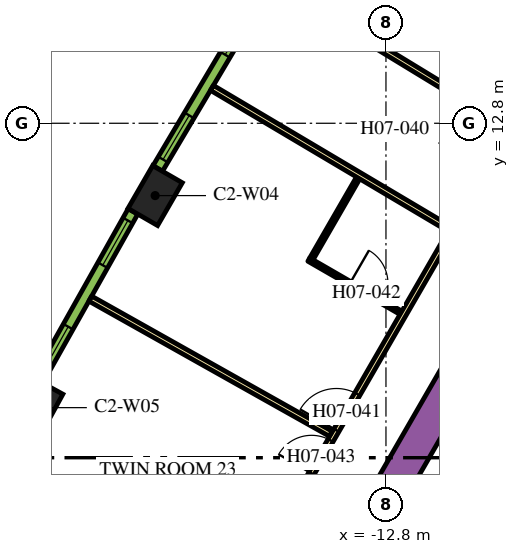
"""IFC4 building model, lengths in metres.
Left out: names, types, materials, properties, quantities, classifications, styles, units other than length and angle.
Written with IfcOpenShell. Run it as: python <this file> out.ifc"""

import sys

from ifc_helpers import new_model, si_unit, direction, frame, frame_2d, origin, origin_2d, place, context, subcontext, project, spatial, rectangle, extrude, element, fill, save


model = new_model("IFC4")
c1 = context("Model", 3, precision=1e-05, world=origin(), true_north=direction((0.0, 1.0)))
c2 = subcontext(c1, "Body", "Model", "MODEL_VIEW")
j1 = project(units=[si_unit("LENGTHUNIT", "METRE"), si_unit("PLANEANGLEUNIT", "RADIAN")], contexts=[c1])
p1 = place(None, origin())
s1 = spatial("IfcSite", under=j1, at=p1, CompositionType="ELEMENT")
p2 = place(p1, origin())
s2 = spatial("IfcBuilding", under=s1, at=p2, CompositionType="ELEMENT")
p3 = place(p2, frame((0.0, 0.0, 99.3)))
s3 = spatial("IfcBuildingStorey", under=s2, at=p3, CompositionType="ELEMENT", Elevation=99.3)
for number, where, z_axis, x_axis in (
    (1, (-18.874, 10.897, 0.0), (0.0, 0.0, 1.0), (-0.5, -0.866, 0.0)),
    (2, (-22.009, 5.317, 0.0), (0.0, 0.0, 1.0), (-0.48, -0.877, 0.0)),
):
    element("IfcColumn", number, at=place(p3, frame(where, z_axis=z_axis, x_axis=x_axis)), inside=s3, PredefinedType="COLUMN", context=c2, shape_type="SweptSolid", body=[
        extrude(rectangle(XDim=1.3, YDim=0.9, at=origin_2d()), origin(), (0.0, 0.0, 1.0), 3.9),
    ])
p4 = place(p3, frame((-15.36, -1.503, 0.0), z_axis=(0.0, 0.0, 1.0), x_axis=(0.50000389221, 0.866023156604, 0.0)))
e3 = element("IfcWall", 3, at=p4, inside=s3, PredefinedType="SOLIDWALL", context=c2, shape_type="SweptSolid", body=[
    extrude(rectangle(XDim=21.0, YDim=0.9, at=frame_2d((10.5, 0.0))), origin(), (0.0, 0.0, 1.0), 3.9),
])
p5 = place(p3, frame((-19.081, -3.9, 0.0), z_axis=(0.0, 0.0, 1.0), x_axis=(0.499998313975, 0.866026377209, 0.0)))
e4 = element("IfcWall", 4, at=p5, inside=s3, PredefinedType="PARTITIONING", context=c2, shape_type="SweptSolid", body=[
    extrude(rectangle(XDim=25.766, YDim=0.15, at=frame_2d((12.883, 0.0))), origin(), (0.0, 0.0, 1.0), 2.75),
])
p6 = place(p5, frame((19.306, 0.0, 0.0)))
e5 = element("IfcOpeningElement", 5, at=p6, cuts=e4, PredefinedType="OPENING", context=c2, shape_type="SweptSolid", body=[
    extrude(rectangle(XDim=1.0, YDim=2.1, at=frame_2d((0.5, 1.05))), frame((0.0, 0.085, 0.0), z_axis=(0.0, -1.0, 0.0), x_axis=(1.0, 0.0, 0.0)), (0.0, 0.0, 1.0), 0.17),
])
p7 = place(p5, frame((17.144, 0.0, 0.0)))
e6 = element("IfcOpeningElement", 6, at=p7, cuts=e4, PredefinedType="OPENING", context=c2, shape_type="SweptSolid", body=[
    extrude(rectangle(XDim=0.9, YDim=2.1, at=frame_2d((0.45, 1.05))), frame((0.0, 0.085, 0.0), z_axis=(0.0, -1.0, 0.0), x_axis=(1.0, 0.0, 0.0)), (0.0, 0.0, 1.0), 0.17),
])
p8 = place(p5, frame((9.955, 0.0, 0.0)))
e7 = element("IfcOpeningElement", 7, at=p8, cuts=e4, PredefinedType="OPENING", context=c2, shape_type="SweptSolid", body=[
    extrude(rectangle(XDim=1.1, YDim=2.1, at=frame_2d((0.55, 1.05))), frame((0.0, 0.085, 0.0), z_axis=(0.0, -1.0, 0.0), x_axis=(1.0, 0.0, 0.0)), (0.0, 0.0, 1.0), 0.17),
])
p9 = place(p5, frame((8.648, 0.0, 0.0)))
e8 = element("IfcOpeningElement", 8, at=p9, cuts=e4, PredefinedType="OPENING", context=c2, shape_type="SweptSolid", body=[
    extrude(rectangle(XDim=1.0, YDim=2.1, at=frame_2d((0.5, 1.05))), frame((0.0, 0.085, 0.0), z_axis=(0.0, -1.0, 0.0), x_axis=(1.0, 0.0, 0.0)), (0.0, 0.0, 1.0), 0.17),
])
p10 = place(p5, frame((1.553, 0.0, 0.0)))
e9 = element("IfcOpeningElement", 9, at=p10, cuts=e4, PredefinedType="OPENING", context=c2, shape_type="SweptSolid", body=[
    extrude(rectangle(XDim=0.9, YDim=2.1, at=frame_2d((0.45, 1.05))), frame((0.0, 0.085, 0.0), z_axis=(0.0, -1.0, 0.0), x_axis=(1.0, 0.0, 0.0)), (0.0, 0.0, 1.0), 0.17),
])
for number, where, z_axis, x_axis in (
    (10, (-20.581, 8.185, 0.0), (0.0, 0.0, 1.0), (0.872, -0.49, 0.0)),
    (11, (-17.379, 13.731, 0.0), (0.0, 0.0, 1.0), (0.86, -0.51, 0.0)),
):
    element("IfcWall", number, at=place(p3, frame(where, z_axis=z_axis, x_axis=x_axis)), inside=s3, PredefinedType="PARTITIONING", context=c2, shape_type="SweptSolid", body=[
        extrude(rectangle(XDim=7.257, YDim=0.15, at=frame_2d((3.628, 0.0))), origin(), (0.0, 0.0, 1.0), 2.75),
    ])
p11 = place(p3, frame((-15.225, 16.167, 0.0), z_axis=(0.0, 0.0, 1.0), x_axis=(0.854088713274, -0.520127359266, 0.0)))
e12 = element("IfcWall", 12, at=p11, inside=s3, PredefinedType="PARTITIONING", context=c2, shape_type="SweptSolid", body=[
    extrude(rectangle(XDim=6.611, YDim=0.15, at=frame_2d((3.305, 0.0))), origin(), (0.0, 0.0, 1.0), 2.75),
])
p12 = place(p3, frame((-14.83, 9.213, 0.0), z_axis=(0.0, 0.0, 1.0), x_axis=(0.866034573852, -0.49998411664, 0.0)))
e13 = element("IfcWall", 13, at=p12, inside=s3, PredefinedType="PARTITIONING", context=c2, shape_type="SweptSolid", body=[
    extrude(rectangle(XDim=2.8, YDim=0.1, at=frame_2d((1.4, 0.0))), origin(), (0.0, 0.0, 1.0), 2.75),
])
p13 = place(p12, frame((1.25, 0.0, 0.0)))
e14 = element("IfcOpeningElement", 14, at=p13, cuts=e13, PredefinedType="OPENING", context=c2, shape_type="SweptSolid", body=[
    extrude(rectangle(XDim=1.0, YDim=2.1, at=frame_2d((0.5, 1.05))), frame((0.0, 0.06, 0.0), z_axis=(0.0, -1.0, 0.0), x_axis=(1.0, 0.0, 0.0)), (0.0, 0.0, 1.0), 0.12),
])
p14 = place(p3, frame((-14.762, 9.231, 0.0), z_axis=(0.0, 0.0, 1.0), x_axis=(0.500003092839, 0.866023618125, 0.0)))
e15 = element("IfcWall", 15, at=p14, inside=s3, PredefinedType="PARTITIONING", context=c2, shape_type="SweptSolid", body=[
    extrude(rectangle(XDim=2.46, YDim=0.1, at=frame_2d((1.23, 0.0))), origin(), (0.0, 0.0, 1.0), 2.75),
])
p15 = place(p3, frame((-16.203, 15.998, 0.0), z_axis=(0.0, 0.0, 1.0), x_axis=(-0.510054281659, -0.860142214847, 0.0)))
e16 = element("IfcWall", 16, at=p15, inside=s3, PredefinedType="SOLIDWALL", context=c2, shape_type="SweptSolid", body=[
    extrude(rectangle(XDim=5.101, YDim=0.29, at=frame_2d((2.55, 0.0))), origin(), (0.0, 0.0, 1.0), 3.65),
])
p16 = place(p15, frame((0.273, 0.0, 0.9)))
e17 = element("IfcOpeningElement", 17, at=p16, cuts=e16, PredefinedType="OPENING", context=c2, shape_type="SweptSolid", body=[
    extrude(rectangle(XDim=1.35, YDim=2.15, at=frame_2d((0.675, 1.075))), frame((0.0, 0.155, 0.0), z_axis=(0.0, -1.0, 0.0), x_axis=(1.0, 0.0, 0.0)), (0.0, 0.0, 1.0), 0.31),
])
p17 = place(p15, frame((3.478, 0.0, 0.9)))
e18 = element("IfcOpeningElement", 18, at=p17, cuts=e16, PredefinedType="OPENING", context=c2, shape_type="SweptSolid", body=[
    extrude(rectangle(XDim=1.35, YDim=2.15, at=frame_2d((0.675, 1.075))), frame((0.0, 0.155, 0.0), z_axis=(0.0, -1.0, 0.0), x_axis=(1.0, 0.0, 0.0)), (0.0, 0.0, 1.0), 0.31),
])
p18 = place(p3, frame((-19.458, 10.48, 0.0), z_axis=(0.0, 0.0, 1.0), x_axis=(-0.48983164787, -0.87181704316, 0.0)))
e19 = element("IfcWall", 19, at=p18, inside=s3, PredefinedType="SOLIDWALL", context=c2, shape_type="SweptSolid", body=[
    extrude(rectangle(XDim=5.1, YDim=0.29, at=frame_2d((2.55, 0.0))), origin(), (0.0, 0.0, 1.0), 3.65),
])
p19 = place(p18, frame((0.272, 0.0, 0.9)))
e20 = element("IfcOpeningElement", 20, at=p19, cuts=e19, PredefinedType="OPENING", context=c2, shape_type="SweptSolid", body=[
    extrude(rectangle(XDim=1.35, YDim=2.15, at=frame_2d((0.675, 1.075))), frame((0.0, 0.155, 0.0), z_axis=(0.0, -1.0, 0.0), x_axis=(1.0, 0.0, 0.0)), (0.0, 0.0, 1.0), 0.31),
])
p20 = place(p18, frame((3.478, 0.0, 0.9)))
e21 = element("IfcOpeningElement", 21, at=p20, cuts=e19, PredefinedType="OPENING", context=c2, shape_type="SweptSolid", body=[
    extrude(rectangle(XDim=1.35, YDim=2.15, at=frame_2d((0.675, 1.075))), frame((0.0, 0.155, 0.0), z_axis=(0.0, -1.0, 0.0), x_axis=(1.0, 0.0, 0.0)), (0.0, 0.0, 1.0), 0.31),
])
p21 = place(p8, origin())
e22 = element("IfcDoor", 22, at=p21, inside=s3, OperationType="SINGLE_SWING_LEFT", PredefinedType="DOOR", context=c2, shape_type="SweptSolid", body=[
    extrude(rectangle(XDim=1.1, YDim=2.1, at=frame_2d((0.55, 1.05))), frame((0.0, 0.025, 0.0), z_axis=(0.0, -1.0, 0.0), x_axis=(1.0, 0.0, 0.0)), (0.0, 0.0, 1.0), 0.05),
])
fill(e7, e22)
p22 = place(p13, origin())
e23 = element("IfcDoor", 23, at=p22, inside=s3, OperationType="SINGLE_SWING_LEFT", PredefinedType="DOOR", context=c2, shape_type="SweptSolid", body=[
    extrude(rectangle(XDim=1.0, YDim=2.1, at=frame_2d((0.5, 1.05))), frame((0.0, 0.025, 0.0), z_axis=(0.0, -1.0, 0.0), x_axis=(1.0, 0.0, 0.0)), (0.0, 0.0, 1.0), 0.05),
])
fill(e14, e23)
p23 = place(p9, origin())
e24 = element("IfcDoor", 24, at=p23, inside=s3, OperationType="SINGLE_SWING_RIGHT", PredefinedType="DOOR", context=c2, shape_type="SweptSolid", body=[
    extrude(rectangle(XDim=1.0, YDim=2.1, at=frame_2d((0.5, 1.05))), frame((0.0, 0.025, 0.0), z_axis=(0.0, -1.0, 0.0), x_axis=(1.0, 0.0, 0.0)), (0.0, 0.0, 1.0), 0.05),
])
fill(e8, e24)
p24 = place(p16, origin())
e25 = element("IfcWindow", 25, at=p24, inside=s3, PartitioningType="DOUBLE_PANEL_VERTICAL", PredefinedType="WINDOW", context=c2, shape_type="SweptSolid", body=[
    extrude(rectangle(XDim=1.35, YDim=2.15, at=frame_2d((0.675, 1.075))), frame((0.0, 0.015, 0.0), z_axis=(0.0, -1.0, 0.0), x_axis=(1.0, 0.0, 0.0)), (0.0, 0.0, 1.0), 0.06),
])
fill(e17, e25)
p25 = place(p17, origin())
e26 = element("IfcWindow", 26, at=p25, inside=s3, PartitioningType="DOUBLE_PANEL_VERTICAL", PredefinedType="WINDOW", context=c2, shape_type="SweptSolid", body=[
    extrude(rectangle(XDim=1.35, YDim=2.15, at=frame_2d((0.675, 1.075))), frame((0.0, 0.015, 0.0), z_axis=(0.0, -1.0, 0.0), x_axis=(1.0, 0.0, 0.0)), (0.0, 0.0, 1.0), 0.06),
])
fill(e18, e26)
p26 = place(p19, origin())
e27 = element("IfcWindow", 27, at=p26, inside=s3, PartitioningType="DOUBLE_PANEL_VERTICAL", PredefinedType="WINDOW", context=c2, shape_type="SweptSolid", body=[
    extrude(rectangle(XDim=1.35, YDim=2.15, at=frame_2d((0.675, 1.075))), frame((0.0, 0.015, 0.0), z_axis=(0.0, -1.0, 0.0), x_axis=(1.0, 0.0, 0.0)), (0.0, 0.0, 1.0), 0.06),
])
fill(e20, e27)
p27 = place(p20, origin())
e28 = element("IfcWindow", 28, at=p27, inside=s3, PartitioningType="DOUBLE_PANEL_VERTICAL", PredefinedType="WINDOW", context=c2, shape_type="SweptSolid", body=[
    extrude(rectangle(XDim=1.35, YDim=2.15, at=frame_2d((0.675, 1.075))), frame((0.0, 0.015, 0.0), z_axis=(0.0, -1.0, 0.0), x_axis=(1.0, 0.0, 0.0)), (0.0, 0.0, 1.0), 0.06),
])
fill(e21, e28)
save(model, sys.argv[1])
